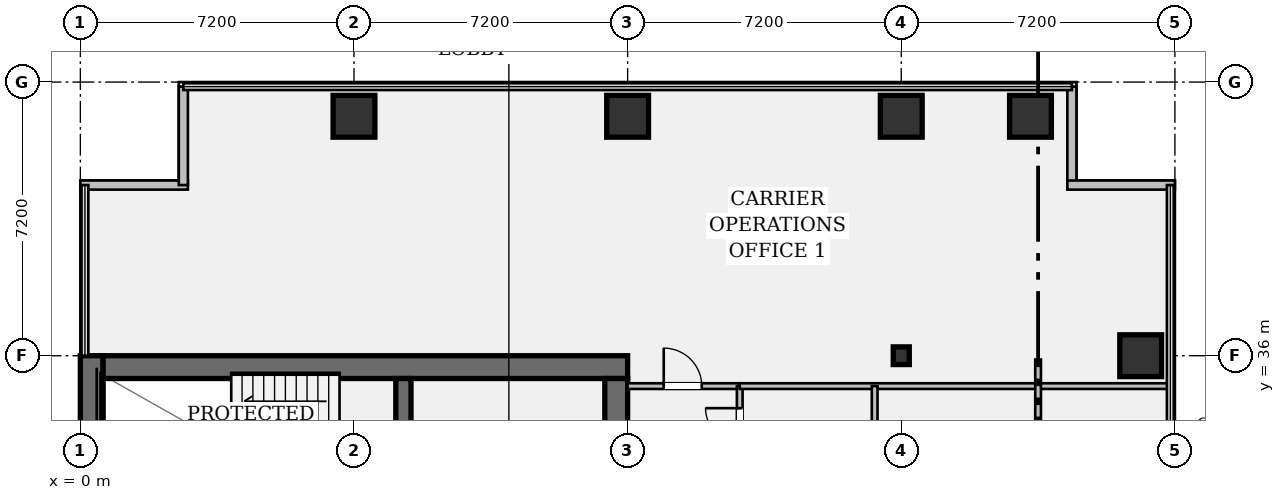
"""IFC4 building model, lengths in metres.
Left out: names, types, materials, properties, quantities, classifications, styles, units other than length and angle.
Written with IfcOpenShell. Run it as: python <this file> out.ifc"""

import sys

from ifc_helpers import new_model, si_unit, direction, frame, frame_2d, origin, origin_2d, place, context, subcontext, project, spatial, rectangle, hollow_rectangle, i_section, extrude, element, fill, save


model = new_model("IFC4")
c1 = context("Model", 3, precision=1e-05, world=origin(), true_north=direction((0.0, 1.0)))
c2 = subcontext(c1, "Body", "Model", "MODEL_VIEW")
j1 = project(units=[si_unit("LENGTHUNIT", "METRE"), si_unit("PLANEANGLEUNIT", "RADIAN")], contexts=[c1])
p1 = place(None, origin())
s1 = spatial("IfcSite", under=j1, at=p1, CompositionType="ELEMENT")
p2 = place(p1, origin())
s2 = spatial("IfcBuilding", under=s1, at=p2, CompositionType="ELEMENT")
p3 = place(p2, frame((0.0, 0.0, 38.85)))
s3 = spatial("IfcBuildingStorey", under=s2, at=p3, CompositionType="ELEMENT", Elevation=38.85)
p4 = place(p3, frame((0.3, 7.2, 0.0), z_axis=(0.0, 0.0, 1.0), x_axis=(0.0, 1.0, 0.0)))
e1 = element("IfcWall", 1, at=p4, inside=s3, PredefinedType="SHEAR", context=c2, shape_type="SweptSolid", body=[
    extrude(rectangle(XDim=28.8, YDim=0.6, at=frame_2d((14.4, 0.0))), origin(), (0.0, 0.0, 1.0), 3.57),
])
p5 = place(p3, frame((0.6, 35.7, 0.0), z_axis=(0.0, 0.0, 1.0), x_axis=(1.0, 0.0, 0.0)))
e2 = element("IfcWall", 2, at=p5, inside=s3, PredefinedType="SHEAR", context=c2, shape_type="SweptSolid", body=[
    extrude(rectangle(XDim=13.8, YDim=0.6, at=frame_2d((6.9, 0.0))), origin(), (0.0, 0.0, 1.0), 3.57),
])
p6 = place(p3, frame((14.1, 35.4, 0.0), z_axis=(0.0, 0.0, 1.0), x_axis=(0.0, -1.0, 0.0)))
e3 = element("IfcWall", 3, at=p6, inside=s3, PredefinedType="SHEAR", context=c2, shape_type="SweptSolid", body=[
    extrude(rectangle(XDim=27.6, YDim=0.6, at=frame_2d((13.8, 0.0))), origin(), (0.0, 0.0, 1.0), 3.57),
])
p7 = place(p6, frame((1.3, 0.0, 0.0)))
e4 = element("IfcOpeningElement", 4, at=p7, cuts=e3, PredefinedType="OPENING", context=c2, shape_type="SweptSolid", body=[
    extrude(rectangle(XDim=1.2, YDim=2.15, at=frame_2d((0.6, 1.075))), frame((0.0, 0.312, 0.0), z_axis=(0.0, -1.0, 0.0), x_axis=(1.0, 0.0, 0.0)), (0.0, 0.0, 1.0), 0.624),
])
p8 = place(p6, frame((25.25, 0.0, 0.0)))
e5 = element("IfcOpeningElement", 5, at=p8, cuts=e3, PredefinedType="OPENING", context=c2, shape_type="SweptSolid", body=[
    extrude(rectangle(XDim=1.2, YDim=2.15, at=frame_2d((0.6, 1.075))), frame((0.0, 0.312, 0.0), z_axis=(0.0, -1.0, 0.0), x_axis=(1.0, 0.0, 0.0)), (0.0, 0.0, 1.0), 0.624),
])
p9 = place(p6, frame((14.6, 0.0, 0.0)))
e6 = element("IfcOpeningElement", 6, at=p9, cuts=e3, PredefinedType="OPENING", context=c2, shape_type="SweptSolid", body=[
    extrude(rectangle(XDim=1.6, YDim=2.2, at=frame_2d((0.8, 1.1))), frame((0.0, 0.312, 0.0), z_axis=(0.0, -1.0, 0.0), x_axis=(1.0, 0.0, 0.0)), (0.0, 0.0, 1.0), 0.624),
])
p10 = place(p3, frame((8.5, 31.72, 0.0), z_axis=(0.0, 0.0, 1.0), x_axis=(0.0, 1.0, 0.0)))
e7 = element("IfcWall", 7, at=p10, inside=s3, PredefinedType="SHEAR", context=c2, shape_type="SweptSolid", body=[
    extrude(rectangle(XDim=3.68, YDim=0.4, at=frame_2d((1.84, 0.0))), origin(), (0.0, 0.0, 1.0), 3.57),
])
p11 = place(p10, frame((0.9, 0.0, 0.0)))
e8 = element("IfcOpeningElement", 8, at=p11, cuts=e7, PredefinedType="OPENING", context=c2, shape_type="SweptSolid", body=[
    extrude(rectangle(XDim=1.1, YDim=2.15, at=frame_2d((0.55, 1.075))), frame((0.0, 0.212, 0.0), z_axis=(0.0, -1.0, 0.0), x_axis=(1.0, 0.0, 0.0)), (0.0, 0.0, 1.0), 0.424),
])
for number, where, z_axis, x_axis in (
    (9, (7.2, 42.3, 0.0), (0.0, 0.0, 1.0), (1.0, 0.0, 0.0)),
    (10, (14.4, 42.3, 0.0), (0.0, 0.0, 1.0), (1.0, 0.0, 0.0)),
):
    element("IfcColumn", number, at=place(p3, frame(where, z_axis=z_axis, x_axis=x_axis)), inside=s3, PredefinedType="COLUMN", context=c2, shape_type="SweptSolid", body=[
        extrude(hollow_rectangle(XDim=1.1, YDim=1.1, WallThickness=0.07, at=origin_2d()), origin(), (0.0, 0.0, 1.0), 3.57),
    ])
p12 = place(p3, frame((21.6, 36.0, 0.0), z_axis=(0.0, 0.0, 1.0), x_axis=(1.0, 0.0, 0.0)))
e11 = element("IfcColumn", 11, at=p12, inside=s3, PredefinedType="COLUMN", context=c2, shape_type="SweptSolid", body=[
    extrude(i_section(OverallWidth=0.422, OverallDepth=0.465, WebThickness=0.045, FlangeThickness=0.073, FilletRadius=0.018, at=origin_2d()), origin(), (0.0, 0.0, 1.0), 3.57),
])
for number, where, z_axis, x_axis in (
    (12, (21.6, 42.3, 0.0), (0.0, 0.0, 1.0), (1.0, 0.0, 0.0)),
    (13, (25.0, 42.3, 0.0), (0.0, 0.0, 1.0), (1.0, 0.0, 0.0)),
    (14, (27.9, 36.0, 0.0), (0.0, 0.0, 1.0), (1.0, 0.0, 0.0)),
):
    element("IfcColumn", number, at=place(p3, frame(where, z_axis=z_axis, x_axis=x_axis)), inside=s3, PredefinedType="COLUMN", context=c2, shape_type="SweptSolid", body=[
        extrude(hollow_rectangle(XDim=1.1, YDim=1.1, WallThickness=0.07, at=origin_2d()), origin(), (0.0, 0.0, 1.0), 3.57),
    ])
p13 = place(p3, frame((0.0, 40.49, 0.0), z_axis=(0.0, 0.0, 1.0), x_axis=(1.0, 0.0, 0.0)))
e15 = element("IfcWall", 15, at=p13, inside=s3, PredefinedType="STANDARD", context=c2, shape_type="SweptSolid", body=[
    extrude(rectangle(XDim=2.83, YDim=0.24, at=frame_2d((1.415, 0.0))), origin(), (0.0, 0.0, 1.0), 3.57),
])
for number, where, z_axis, x_axis in (
    (16, (2.71, 40.49, 0.0), (0.0, 0.0, 1.0), (0.0, 1.0, 0.0)),
    (17, (26.09, 43.08, 0.0), (0.0, 0.0, 1.0), (0.0, -1.0, 0.0)),
):
    element("IfcWall", number, at=place(p3, frame(where, z_axis=z_axis, x_axis=x_axis)), inside=s3, PredefinedType="STANDARD", context=c2, shape_type="SweptSolid", body=[
        extrude(rectangle(XDim=2.59, YDim=0.24, at=frame_2d((1.295, 0.0))), origin(), (0.0, 0.0, 1.0), 3.57),
    ])
p14 = place(p3, frame((25.97, 40.49, 0.0), z_axis=(0.0, 0.0, 1.0), x_axis=(1.0, 0.0, 0.0)))
e18 = element("IfcWall", 18, at=p14, inside=s3, PredefinedType="STANDARD", context=c2, shape_type="SweptSolid", body=[
    extrude(rectangle(XDim=2.83, YDim=0.24, at=frame_2d((1.415, 0.0))), origin(), (0.0, 0.0, 1.0), 3.57),
])
p15 = place(p3, frame((14.4, 35.2, 0.0), z_axis=(0.0, 0.0, 1.0), x_axis=(1.0, 0.0, 0.0)))
e19 = element("IfcWall", 19, at=p15, inside=s3, PredefinedType="PARTITIONING", context=c2, shape_type="SweptSolid", body=[
    extrude(rectangle(XDim=2.95, YDim=0.15, at=frame_2d((1.475, 0.0))), origin(), (0.0, 0.0, 1.0), 2.628),
])
p16 = place(p15, frame((0.95, 0.0, 0.0)))
e20 = element("IfcOpeningElement", 20, at=p16, cuts=e19, PredefinedType="OPENING", context=c2, shape_type="SweptSolid", body=[
    extrude(rectangle(XDim=1.0, YDim=2.15, at=frame_2d((0.5, 1.075))), frame((0.0, 0.087, 0.0), z_axis=(0.0, -1.0, 0.0), x_axis=(1.0, 0.0, 0.0)), (0.0, 0.0, 1.0), 0.174),
])
p17 = place(p3, frame((17.35, 13.0, 0.0), z_axis=(0.0, 0.0, 1.0), x_axis=(0.0, 1.0, 0.0)))
e21 = element("IfcWall", 21, at=p17, inside=s3, PredefinedType="PARTITIONING", context=c2, shape_type="SweptSolid", body=[
    extrude(rectangle(XDim=22.2, YDim=0.15, at=frame_2d((11.1, 0.0))), origin(), (0.0, 0.0, 1.0), 2.628),
])
p18 = place(p17, frame((10.98, 0.0, 0.0)))
e22 = element("IfcOpeningElement", 22, at=p18, cuts=e21, PredefinedType="OPENING", context=c2, shape_type="SweptSolid", body=[
    extrude(rectangle(XDim=0.9, YDim=2.15, at=frame_2d((0.45, 1.075))), frame((0.0, 0.087, 0.0), z_axis=(0.0, -1.0, 0.0), x_axis=(1.0, 0.0, 0.0)), (0.0, 0.0, 1.0), 0.174),
])
p19 = place(p17, frame((14.23, 0.0, 0.0)))
e23 = element("IfcOpeningElement", 23, at=p19, cuts=e21, PredefinedType="OPENING", context=c2, shape_type="SweptSolid", body=[
    extrude(rectangle(XDim=0.9, YDim=2.15, at=frame_2d((0.45, 1.075))), frame((0.0, 0.087, 0.0), z_axis=(0.0, -1.0, 0.0), x_axis=(1.0, 0.0, 0.0)), (0.0, 0.0, 1.0), 0.174),
])
p20 = place(p17, frame((17.48, 0.0, 0.0)))
e24 = element("IfcOpeningElement", 24, at=p20, cuts=e21, PredefinedType="OPENING", context=c2, shape_type="SweptSolid", body=[
    extrude(rectangle(XDim=0.9, YDim=2.15, at=frame_2d((0.45, 1.075))), frame((0.0, 0.087, 0.0), z_axis=(0.0, -1.0, 0.0), x_axis=(1.0, 0.0, 0.0)), (0.0, 0.0, 1.0), 0.174),
])
p21 = place(p17, frame((20.72, 0.0, 0.0)))
e25 = element("IfcOpeningElement", 25, at=p21, cuts=e21, PredefinedType="OPENING", context=c2, shape_type="SweptSolid", body=[
    extrude(rectangle(XDim=0.9, YDim=2.15, at=frame_2d((0.45, 1.075))), frame((0.0, 0.087, 0.0), z_axis=(0.0, -1.0, 0.0), x_axis=(1.0, 0.0, 0.0)), (0.0, 0.0, 1.0), 0.174),
])
p22 = place(p3, frame((17.35, 35.2, 0.0), z_axis=(0.0, 0.0, 1.0), x_axis=(1.0, 0.0, 0.0)))
e26 = element("IfcWall", 26, at=p22, inside=s3, PredefinedType="PARTITIONING", context=c2, shape_type="SweptSolid", body=[
    extrude(rectangle(XDim=11.33, YDim=0.15, at=frame_2d((5.665, 0.0))), origin(), (0.0, 0.0, 1.0), 2.628),
])
p23 = place(p3, frame((20.9, 22.7, 0.0), z_axis=(0.0, 0.0, 1.0), x_axis=(0.0, 1.0, 0.0)))
e27 = element("IfcWall", 27, at=p23, inside=s3, PredefinedType="PARTITIONING", context=c2, shape_type="SweptSolid", body=[
    extrude(rectangle(XDim=12.5, YDim=0.15, at=frame_2d((6.25, 0.0))), origin(), (0.0, 0.0, 1.0), 2.628),
])
p24 = place(p3, frame((25.2, 13.0, 0.0), z_axis=(0.0, 0.0, 1.0), x_axis=(0.0, 1.0, 0.0)))
e28 = element("IfcWall", 28, at=p24, inside=s3, PredefinedType="PARTITIONING", context=c2, shape_type="SweptSolid", body=[
    extrude(rectangle(XDim=22.9, YDim=0.15, at=frame_2d((11.45, 0.0))), origin(), (0.0, 0.0, 1.0), 2.628),
])
p25 = place(p16, origin())
e29 = element("IfcDoor", 29, at=p25, inside=s3, OperationType="SINGLE_SWING_LEFT", PredefinedType="DOOR", context=c2, shape_type="SweptSolid", body=[
    extrude(rectangle(XDim=1.0, YDim=2.15, at=frame_2d((0.5, 1.075))), frame((0.0, 0.025, 0.0), z_axis=(0.0, -1.0, 0.0), x_axis=(1.0, 0.0, 0.0)), (0.0, 0.0, 1.0), 0.05),
])
fill(e20, e29)
p26 = place(p21, origin())
e30 = element("IfcDoor", 30, at=p26, inside=s3, OperationType="SINGLE_SWING_RIGHT", PredefinedType="DOOR", context=c2, shape_type="SweptSolid", body=[
    extrude(rectangle(XDim=0.9, YDim=2.15, at=frame_2d((0.45, 1.075))), frame((0.0, 0.025, 0.0), z_axis=(0.0, -1.0, 0.0), x_axis=(1.0, 0.0, 0.0)), (0.0, 0.0, 1.0), 0.05),
])
fill(e25, e30)
save(model, sys.argv[1])
